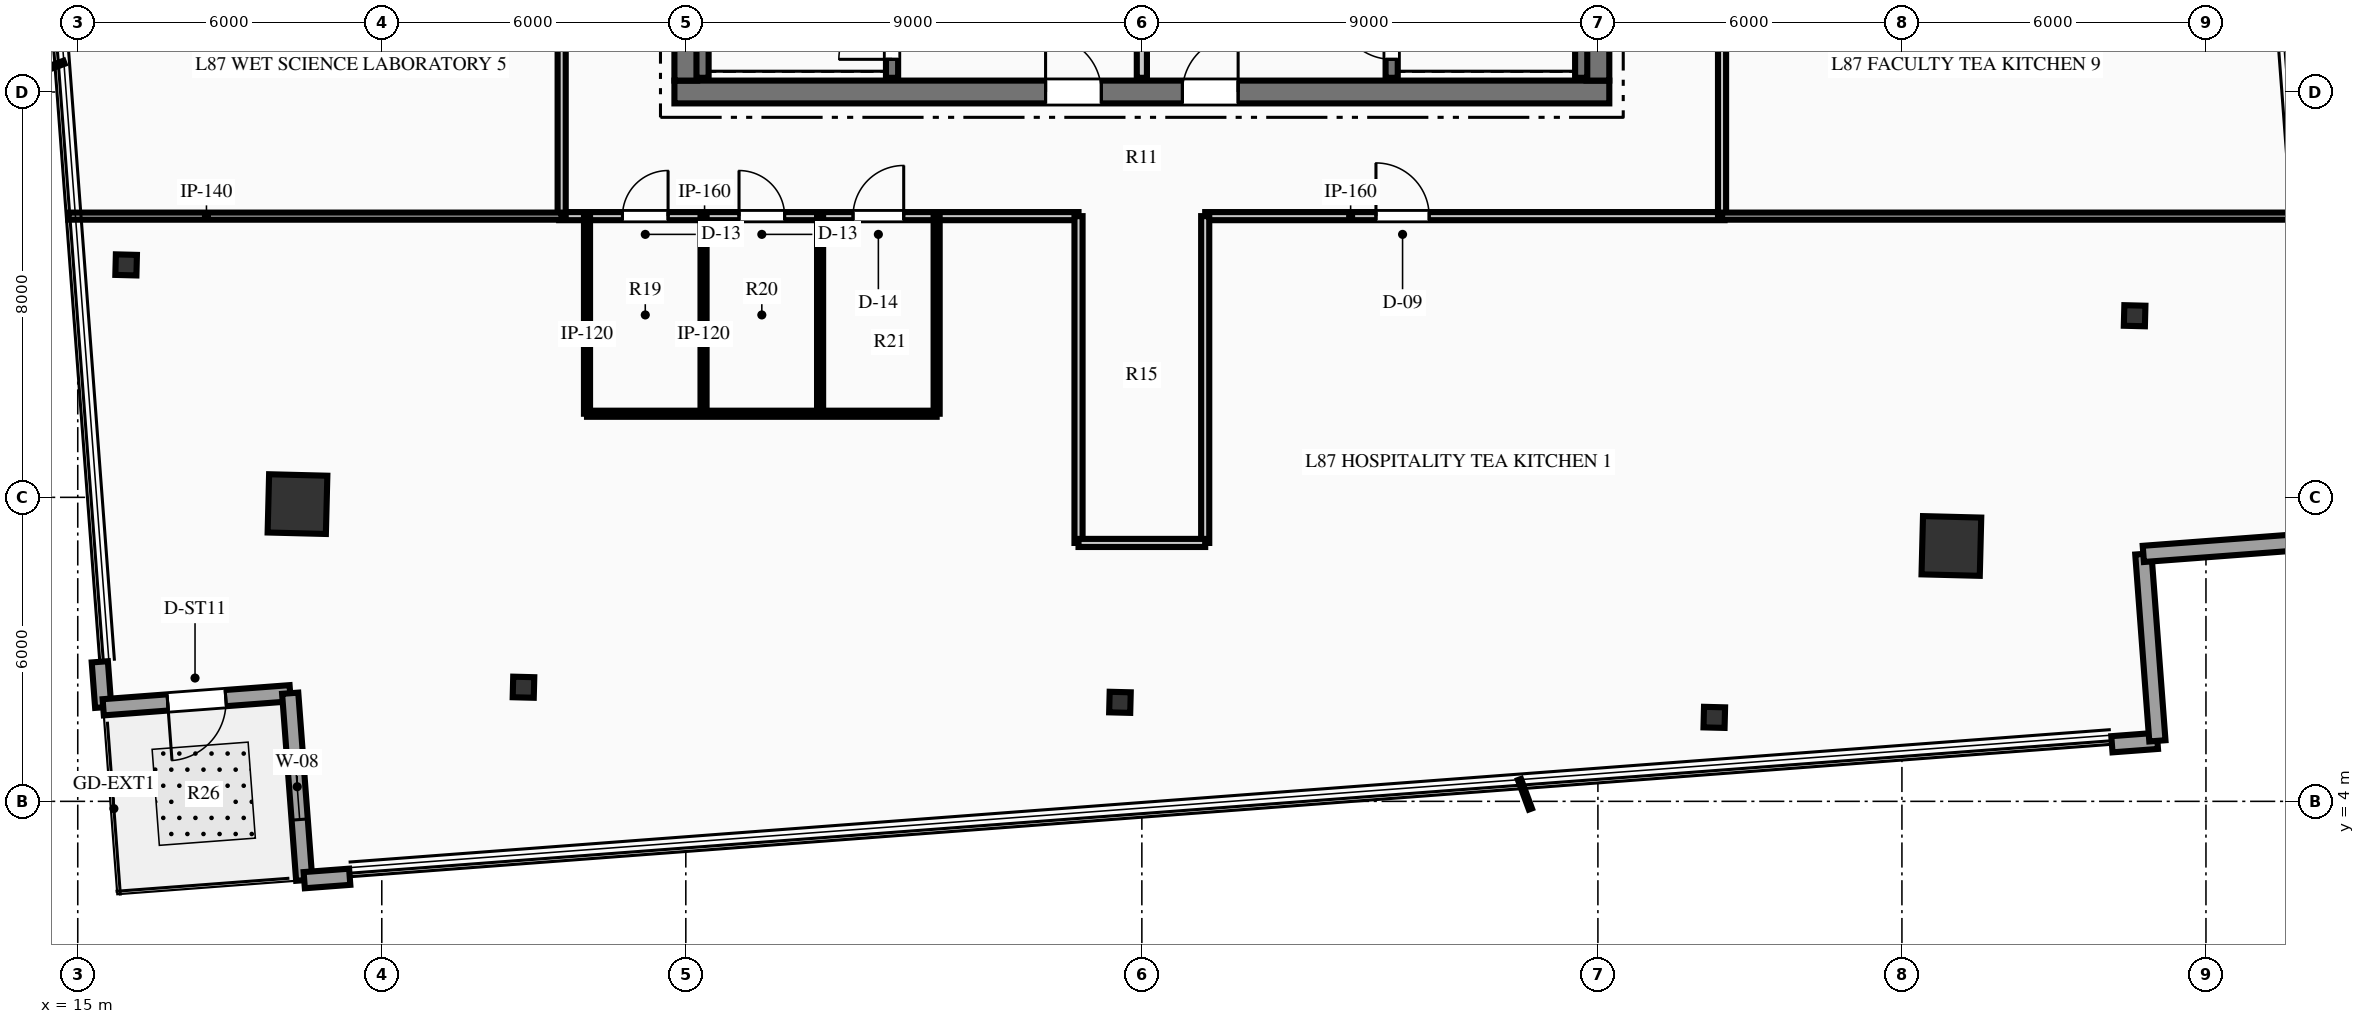
"""IFC4 building model, lengths in metres.
Left out: names, types, materials, properties, quantities, classifications, styles, units other than length and angle.
Written with IfcOpenShell. Run it as: python <this file> out.ifc"""

import sys

from ifc_helpers import new_model, si_unit, direction, frame, frame_2d, origin, origin_2d, place, context, subcontext, project, spatial, rectangle, hollow_rectangle, i_section, extrude, element, fill, save


model = new_model("IFC4")
c1 = context("Model", 3, precision=1e-05, world=origin(), true_north=direction((0.0, 1.0)))
c2 = subcontext(c1, "Body", "Model", "MODEL_VIEW")
j1 = project(units=[si_unit("LENGTHUNIT", "METRE"), si_unit("PLANEANGLEUNIT", "RADIAN")], contexts=[c1])
p1 = place(None, origin())
s1 = spatial("IfcSite", under=j1, at=p1, CompositionType="ELEMENT")
p2 = place(p1, origin())
s2 = spatial("IfcBuilding", under=s1, at=p2, CompositionType="ELEMENT")
p3 = place(p2, frame((0.0, 0.0, 343.95)))
s3 = spatial("IfcBuildingStorey", under=s2, at=p3, CompositionType="ELEMENT", Elevation=343.95)
p4 = place(p3, frame((26.775, 18.0, 0.0), z_axis=(0.0, 0.0, 1.0), x_axis=(1.0, 0.0, 0.0)))
e1 = element("IfcWall", 1, at=p4, inside=s3, PredefinedType="SHEAR", context=c2, shape_type="SweptSolid", body=[
    extrude(rectangle(XDim=18.45, YDim=0.45, at=frame_2d((9.225, 0.0))), origin(), (0.0, 0.0, 1.0), 3.75),
])
p5 = place(p4, frame((7.325, 0.0, 0.0)))
e2 = element("IfcOpeningElement", 2, at=p5, cuts=e1, PredefinedType="OPENING", context=c2, shape_type="SweptSolid", body=[
    extrude(rectangle(XDim=1.1, YDim=2.15, at=frame_2d((0.55, 1.075))), frame((0.0, 0.235, 0.0), z_axis=(0.0, -1.0, 0.0), x_axis=(1.0, 0.0, 0.0)), (0.0, 0.0, 1.0), 0.47),
])
p6 = place(p4, frame((10.025, 0.0, 0.0)))
e3 = element("IfcOpeningElement", 3, at=p6, cuts=e1, PredefinedType="OPENING", context=c2, shape_type="SweptSolid", body=[
    extrude(rectangle(XDim=1.1, YDim=2.15, at=frame_2d((0.55, 1.075))), frame((0.0, 0.235, 0.0), z_axis=(0.0, -1.0, 0.0), x_axis=(1.0, 0.0, 0.0)), (0.0, 0.0, 1.0), 0.47),
])
p7 = place(p3, frame((27.0, 18.225, 0.0), z_axis=(0.0, 0.0, 1.0), x_axis=(0.0, 1.0, 0.0)))
e4 = element("IfcWall", 4, at=p7, inside=s3, PredefinedType="SHEAR", context=c2, shape_type="SweptSolid", body=[
    extrude(rectangle(XDim=15.55, YDim=0.45, at=frame_2d((7.775, 0.0))), origin(), (0.0, 0.0, 1.0), 3.75),
])
p8 = place(p7, frame((10.015, 0.0, 0.0)))
e5 = element("IfcOpeningElement", 5, at=p8, cuts=e4, PredefinedType="OPENING", context=c2, shape_type="SweptSolid", body=[
    extrude(rectangle(XDim=1.4, YDim=2.2, at=frame_2d((0.7, 1.1))), frame((0.0, 0.235, 0.0), z_axis=(0.0, -1.0, 0.0), x_axis=(1.0, 0.0, 0.0)), (0.0, 0.0, 1.0), 0.47),
])
p9 = place(p3, frame((45.0, 18.225, 0.0), z_axis=(0.0, 0.0, 1.0), x_axis=(0.0, 1.0, 0.0)))
e6 = element("IfcWall", 6, at=p9, inside=s3, PredefinedType="SHEAR", context=c2, shape_type="SweptSolid", body=[
    extrude(rectangle(XDim=15.55, YDim=0.45, at=frame_2d((7.775, 0.0))), origin(), (0.0, 0.0, 1.0), 3.75),
])
p10 = place(p9, frame((10.015, 0.0, 0.0)))
e7 = element("IfcOpeningElement", 7, at=p10, cuts=e6, PredefinedType="OPENING", context=c2, shape_type="SweptSolid", body=[
    extrude(rectangle(XDim=1.4, YDim=2.2, at=frame_2d((0.7, 1.1))), frame((0.0, 0.235, 0.0), z_axis=(0.0, -1.0, 0.0), x_axis=(1.0, 0.0, 0.0)), (0.0, 0.0, 1.0), 0.47),
])
p11 = place(p3, frame((31.07, 18.28, 0.0), z_axis=(0.0, 0.0, 1.0), x_axis=(0.0, 1.0, 0.0)))
e8 = element("IfcWall", 8, at=p11, inside=s3, PredefinedType="SHEAR", context=c2, shape_type="SweptSolid", body=[
    extrude(rectangle(XDim=8.26, YDim=0.24, at=frame_2d((4.13, 0.0))), origin(), (0.0, 0.0, 1.0), 3.75),
])
p12 = place(p11, frame((0.365, 0.0, 0.0)))
e9 = element("IfcOpeningElement", 9, at=p12, cuts=e8, PredefinedType="OPENING", context=c2, shape_type="SweptSolid", body=[
    extrude(rectangle(XDim=1.05, YDim=2.15, at=frame_2d((0.525, 1.075))), frame((0.0, 0.13, 0.0), z_axis=(0.0, -1.0, 0.0), x_axis=(1.0, 0.0, 0.0)), (0.0, 0.0, 1.0), 0.26),
])
p13 = place(p3, frame((27.33, 18.28, 0.0), z_axis=(0.0, 0.0, 1.0), x_axis=(0.0, 1.0, 0.0)))
e10 = element("IfcWall", 10, at=p13, inside=s3, PredefinedType="SHEAR", context=c2, shape_type="SweptSolid", body=[
    extrude(rectangle(XDim=8.26, YDim=0.24, at=frame_2d((4.13, 0.0))), origin(), (0.0, 0.0, 1.0), 3.75),
])
p14 = place(p3, frame((40.93, 18.28, 0.0), z_axis=(0.0, 0.0, 1.0), x_axis=(0.0, 1.0, 0.0)))
e11 = element("IfcWall", 11, at=p14, inside=s3, PredefinedType="SHEAR", context=c2, shape_type="SweptSolid", body=[
    extrude(rectangle(XDim=8.26, YDim=0.24, at=frame_2d((4.13, 0.0))), origin(), (0.0, 0.0, 1.0), 3.75),
])
p15 = place(p14, frame((0.365, 0.0, 0.0)))
e12 = element("IfcOpeningElement", 12, at=p15, cuts=e11, PredefinedType="OPENING", context=c2, shape_type="SweptSolid", body=[
    extrude(rectangle(XDim=1.05, YDim=2.15, at=frame_2d((0.525, 1.075))), frame((0.0, 0.13, 0.0), z_axis=(0.0, -1.0, 0.0), x_axis=(1.0, 0.0, 0.0)), (0.0, 0.0, 1.0), 0.26),
])
p16 = place(p3, frame((44.67, 18.28, 0.0), z_axis=(0.0, 0.0, 1.0), x_axis=(0.0, 1.0, 0.0)))
e13 = element("IfcWall", 13, at=p16, inside=s3, PredefinedType="SHEAR", context=c2, shape_type="SweptSolid", body=[
    extrude(rectangle(XDim=8.26, YDim=0.24, at=frame_2d((4.13, 0.0))), origin(), (0.0, 0.0, 1.0), 3.75),
])
for number, where, z_axis, x_axis in (
    (14, (51.976, 9.04, 0.0), (0.0, 0.0, 1.0), (0.025, 1.0, 0.0)),
    (15, (19.336, 9.866, 0.0), (0.0, 0.0, 1.0), (0.025, 1.0, 0.0)),
):
    element("IfcColumn", number, at=place(p3, frame(where, z_axis=z_axis, x_axis=x_axis)), inside=s3, PredefinedType="COLUMN", context=c2, shape_type="SweptSolid", body=[
        extrude(hollow_rectangle(XDim=1.15, YDim=1.15, WallThickness=0.05, at=origin_2d()), origin(), (0.0, 0.0, 1.0), 3.75),
    ])
for number, where, z_axis, x_axis in (
    (16, (55.592, 13.584, 0.0), (0.0, 0.0, 1.0), (0.025, 1.0, 0.0)),
    (17, (15.955, 14.588, 0.0), (0.0, 0.0, 1.0), (0.025, 1.0, 0.0)),
    (18, (23.796, 6.252, 0.0), (0.0, 0.0, 1.0), (0.025, 1.0, 0.0)),
    (19, (35.568, 5.955, 0.0), (0.0, 0.0, 1.0), (0.025, 1.0, 0.0)),
    (20, (47.297, 5.658, 0.0), (0.0, 0.0, 1.0), (0.025, 1.0, 0.0)),
):
    element("IfcColumn", number, at=place(p3, frame(where, z_axis=z_axis, x_axis=x_axis)), inside=s3, PredefinedType="COLUMN", context=c2, shape_type="SweptSolid", body=[
        extrude(i_section(OverallWidth=0.406, OverallDepth=0.416, WebThickness=0.03, FlangeThickness=0.048, at=origin_2d()), origin(), (0.0, 0.0, 1.0), 3.75),
    ])
p17 = place(p3, frame((15.503, 5.856, 0.0), z_axis=(0.0, 0.0, 1.0), x_axis=(-0.075140616575, 0.997172947758, 0.0)))
e21 = element("IfcWall", 21, at=p17, inside=s3, PredefinedType="STANDARD", context=c2, shape_type="SweptSolid", body=[
    extrude(rectangle(XDim=0.9, YDim=0.32, at=frame_2d((0.45, 0.0))), origin(), (0.0, 0.0, 1.0), 3.43),
])
p18 = place(p3, frame((19.192, 6.134, 0.0), z_axis=(0.0, 0.0, 1.0), x_axis=(-0.99718649992, -0.074960552138, 0.0)))
e22 = element("IfcWall", 22, at=p18, inside=s3, PredefinedType="STANDARD", context=c2, shape_type="SweptSolid", body=[
    extrude(rectangle(XDim=3.7, YDim=0.32, at=frame_2d((1.85, 0.0))), origin(), (0.0, 0.0, 1.0), 3.43),
])
p19 = place(p18, frame((1.275, 0.0, 0.0)))
e23 = element("IfcOpeningElement", 23, at=p19, cuts=e22, PredefinedType="OPENING", context=c2, shape_type="SweptSolid", body=[
    extrude(rectangle(XDim=1.15, YDim=2.2, at=frame_2d((0.575, 1.1))), frame((0.0, 0.17, 0.0), z_axis=(0.0, -1.0, 0.0), x_axis=(1.0, 0.0, 0.0)), (0.0, 0.0, 1.0), 0.34),
])
p20 = place(p3, frame((19.469, 2.444, 0.0), z_axis=(0.0, 0.0, 1.0), x_axis=(-0.074960552138, 0.99718649992, 0.0)))
e24 = element("IfcWall", 24, at=p20, inside=s3, PredefinedType="STANDARD", context=c2, shape_type="SweptSolid", body=[
    extrude(rectangle(XDim=3.7, YDim=0.32, at=frame_2d((1.85, 0.0))), origin(), (0.0, 0.0, 1.0), 3.43),
])
p21 = place(p20, frame((1.2, 0.0, 0.85)))
e25 = element("IfcOpeningElement", 25, at=p21, cuts=e24, PredefinedType="OPENING", context=c2, shape_type="SweptSolid", body=[
    extrude(rectangle(XDim=1.3, YDim=1.9, at=frame_2d((0.65, 0.95))), frame((0.0, 0.17, 0.0), z_axis=(0.0, -1.0, 0.0), x_axis=(1.0, 0.0, 0.0)), (0.0, 0.0, 1.0), 0.34),
])
for number, where, z_axis, x_axis in (
    (26, (56.042, 5.194, 0.0), (0.0, 0.0, 1.0), (-0.997, -0.075, 0.0)),
    (27, (20.367, 2.512, 0.0), (0.0, 0.0, 1.0), (-0.997, -0.075, 0.0)),
):
    element("IfcWall", number, at=place(p3, frame(where, z_axis=z_axis, x_axis=x_axis)), inside=s3, PredefinedType="STANDARD", context=c2, shape_type="SweptSolid", body=[
        extrude(rectangle(XDim=0.9, YDim=0.32, at=frame_2d((0.45, 0.0))), origin(), (0.0, 0.0, 1.0), 3.43),
    ])
for number, where, z_axis, x_axis in (
    (28, (55.764, 8.884, 0.0), (0.0, 0.0, 1.0), (0.075, -0.997, 0.0)),
    (29, (59.454, 9.161, 0.0), (0.0, 0.0, 1.0), (-0.997, -0.075, 0.0)),
):
    element("IfcWall", number, at=place(p3, frame(where, z_axis=z_axis, x_axis=x_axis)), inside=s3, PredefinedType="STANDARD", context=c2, shape_type="SweptSolid", body=[
        extrude(rectangle(XDim=3.7, YDim=0.32, at=frame_2d((1.85, 0.0))), origin(), (0.0, 0.0, 1.0), 3.43),
    ])
p22 = place(p3, frame((36.0, 18.28, 0.0), z_axis=(0.0, 0.0, 1.0), x_axis=(0.0, 1.0, 0.0)))
e30 = element("IfcWall", 30, at=p22, inside=s3, PredefinedType="PARTITIONING", context=c2, shape_type="SweptSolid", body=[
    extrude(rectangle(XDim=3.77, YDim=0.2, at=frame_2d((1.885, 0.0))), origin(), (0.0, 0.0, 1.0), 3.43),
])
p23 = place(p3, frame((24.5, 15.55, 0.0), z_axis=(0.0, 0.0, 1.0), x_axis=(1.0, 0.0, 0.0)))
e31 = element("IfcWall", 31, at=p23, inside=s3, PredefinedType="PARTITIONING", context=c2, shape_type="SweptSolid", body=[
    extrude(rectangle(XDim=10.25, YDim=0.16, at=frame_2d((5.125, 0.0))), origin(), (0.0, 0.0, 1.0), 3.43),
])
p24 = place(p23, frame((1.25, 0.0, 0.0)))
e32 = element("IfcOpeningElement", 32, at=p24, cuts=e31, PredefinedType="OPENING", context=c2, shape_type="SweptSolid", body=[
    extrude(rectangle(XDim=0.9, YDim=2.15, at=frame_2d((0.45, 1.075))), frame((0.0, 0.09, 0.0), z_axis=(0.0, -1.0, 0.0), x_axis=(1.0, 0.0, 0.0)), (0.0, 0.0, 1.0), 0.18),
])
p25 = place(p23, frame((3.55, 0.0, 0.0)))
e33 = element("IfcOpeningElement", 33, at=p25, cuts=e31, PredefinedType="OPENING", context=c2, shape_type="SweptSolid", body=[
    extrude(rectangle(XDim=0.9, YDim=2.15, at=frame_2d((0.45, 1.075))), frame((0.0, 0.09, 0.0), z_axis=(0.0, -1.0, 0.0), x_axis=(1.0, 0.0, 0.0)), (0.0, 0.0, 1.0), 0.18),
])
p26 = place(p23, frame((5.8, 0.0, 0.0)))
e34 = element("IfcOpeningElement", 34, at=p26, cuts=e31, PredefinedType="OPENING", context=c2, shape_type="SweptSolid", body=[
    extrude(rectangle(XDim=1.0, YDim=2.15, at=frame_2d((0.5, 1.075))), frame((0.0, 0.09, 0.0), z_axis=(0.0, -1.0, 0.0), x_axis=(1.0, 0.0, 0.0)), (0.0, 0.0, 1.0), 0.18),
])
p27 = place(p3, frame((37.25, 15.55, 0.0), z_axis=(0.0, 0.0, 1.0), x_axis=(1.0, 0.0, 0.0)))
e35 = element("IfcWall", 35, at=p27, inside=s3, PredefinedType="PARTITIONING", context=c2, shape_type="SweptSolid", body=[
    extrude(rectangle(XDim=10.25, YDim=0.16, at=frame_2d((5.125, 0.0))), origin(), (0.0, 0.0, 1.0), 3.43),
])
p28 = place(p27, frame((3.37, 0.0, 0.0)))
e36 = element("IfcOpeningElement", 36, at=p28, cuts=e35, PredefinedType="OPENING", context=c2, shape_type="SweptSolid", body=[
    extrude(rectangle(XDim=1.05, YDim=2.15, at=frame_2d((0.525, 1.075))), frame((0.0, 0.09, 0.0), z_axis=(0.0, -1.0, 0.0), x_axis=(1.0, 0.0, 0.0)), (0.0, 0.0, 1.0), 0.18),
])
p29 = place(p3, frame((24.55, 15.55, 0.0), z_axis=(0.0, 0.0, 1.0), x_axis=(0.0, 1.0, 0.0)))
e37 = element("IfcWall", 37, at=p29, inside=s3, PredefinedType="PARTITIONING", context=c2, shape_type="SweptSolid", body=[
    extrude(rectangle(XDim=9.2, YDim=0.16, at=frame_2d((4.6, 0.0))), origin(), (0.0, 0.0, 1.0), 3.43),
])
p30 = place(p29, frame((3.747, 0.0, 0.0)))
e38 = element("IfcOpeningElement", 38, at=p30, cuts=e37, PredefinedType="OPENING", context=c2, shape_type="SweptSolid", body=[
    extrude(rectangle(XDim=1.05, YDim=2.15, at=frame_2d((0.525, 1.075))), frame((0.0, 0.09, 0.0), z_axis=(0.0, -1.0, 0.0), x_axis=(1.0, 0.0, 0.0)), (0.0, 0.0, 1.0), 0.18),
])
p31 = place(p3, frame((47.45, 15.55, 0.0), z_axis=(0.0, 0.0, 1.0), x_axis=(0.0, 1.0, 0.0)))
e39 = element("IfcWall", 39, at=p31, inside=s3, PredefinedType="PARTITIONING", context=c2, shape_type="SweptSolid", body=[
    extrude(rectangle(XDim=9.2, YDim=0.16, at=frame_2d((4.6, 0.0))), origin(), (0.0, 0.0, 1.0), 3.43),
])
p32 = place(p31, frame((3.747, 0.0, 0.0)))
e40 = element("IfcOpeningElement", 40, at=p32, cuts=e39, PredefinedType="OPENING", context=c2, shape_type="SweptSolid", body=[
    extrude(rectangle(XDim=1.05, YDim=2.15, at=frame_2d((0.525, 1.075))), frame((0.0, 0.09, 0.0), z_axis=(0.0, -1.0, 0.0), x_axis=(1.0, 0.0, 0.0)), (0.0, 0.0, 1.0), 0.18),
])
for number, where, z_axis, x_axis in (
    (41, (34.75, 9.1, 0.0), (0.0, 0.0, 1.0), (0.0, 1.0, 0.0)),
    (42, (37.25, 9.1, 0.0), (0.0, 0.0, 1.0), (0.0, 1.0, 0.0)),
):
    element("IfcWall", number, at=place(p3, frame(where, z_axis=z_axis, x_axis=x_axis)), inside=s3, PredefinedType="PARTITIONING", context=c2, shape_type="SweptSolid", body=[
        extrude(rectangle(XDim=6.45, YDim=0.16, at=frame_2d((3.225, 0.0))), origin(), (0.0, 0.0, 1.0), 3.43),
    ])
p33 = place(p3, frame((34.75, 9.1, 0.0), z_axis=(0.0, 0.0, 1.0), x_axis=(1.0, 0.0, 0.0)))
e43 = element("IfcWall", 43, at=p33, inside=s3, PredefinedType="PARTITIONING", context=c2, shape_type="SweptSolid", body=[
    extrude(rectangle(XDim=2.5, YDim=0.16, at=frame_2d((1.25, 0.0))), origin(), (0.0, 0.0, 1.0), 3.43),
])
p34 = place(p3, frame((25.05, 11.65, 0.0), z_axis=(0.0, 0.0, 1.0), x_axis=(0.0, 1.0, 0.0)))
e44 = element("IfcWall", 44, at=p34, inside=s3, PredefinedType="PARTITIONING", context=c2, shape_type="SweptSolid", body=[
    extrude(rectangle(XDim=3.9, YDim=0.12, at=frame_2d((1.95, 0.0))), origin(), (0.0, 0.0, 1.0), 3.019),
])
for number, where, z_axis, x_axis in (
    (45, (27.35, 11.65, 0.0), (0.0, 0.0, 1.0), (0.0, 1.0, 0.0)),
    (46, (29.65, 11.65, 0.0), (0.0, 0.0, 1.0), (0.0, 1.0, 0.0)),
    (47, (31.95, 11.65, 0.0), (0.0, 0.0, 1.0), (0.0, 1.0, 0.0)),
):
    element("IfcWall", number, at=place(p3, frame(where, z_axis=z_axis, x_axis=x_axis)), inside=s3, PredefinedType="PARTITIONING", context=c2, shape_type="SweptSolid", body=[
        extrude(rectangle(XDim=3.9, YDim=0.12, at=frame_2d((1.95, 0.0))), origin(), (0.0, 0.0, 1.0), 3.43),
    ])
p35 = place(p3, frame((25.05, 11.65, 0.0), z_axis=(0.0, 0.0, 1.0), x_axis=(1.0, 0.0, 0.0)))
e48 = element("IfcWall", 48, at=p35, inside=s3, PredefinedType="PARTITIONING", context=c2, shape_type="SweptSolid", body=[
    extrude(rectangle(XDim=6.9, YDim=0.12, at=frame_2d((3.45, 0.0))), origin(), (0.0, 0.0, 1.0), 3.43),
])
p36 = place(p3, frame((14.814, 15.55, 0.0), z_axis=(0.0, 0.0, 1.0), x_axis=(1.0, 0.0, 0.0)))
e49 = element("IfcWall", 49, at=p36, inside=s3, PredefinedType="PARTITIONING", context=c2, shape_type="SweptSolid", body=[
    extrude(rectangle(XDim=9.736, YDim=0.14, at=frame_2d((4.868, 0.0))), origin(), (0.0, 0.0, 1.0), 2.808),
])
p37 = place(p3, frame((47.45, 15.55, 0.0), z_axis=(0.0, 0.0, 1.0), x_axis=(1.0, 0.0, 0.0)))
e50 = element("IfcWall", 50, at=p37, inside=s3, PredefinedType="PARTITIONING", context=c2, shape_type="SweptSolid", body=[
    extrude(rectangle(XDim=11.483, YDim=0.14, at=frame_2d((5.742, 0.0))), origin(), (0.0, 0.0, 1.0), 3.019),
])
p38 = place(p19, origin())
e51 = element("IfcDoor", 51, at=p38, inside=s3, OperationType="SINGLE_SWING_RIGHT", PredefinedType="DOOR", context=c2, shape_type="SweptSolid", body=[
    extrude(rectangle(XDim=1.15, YDim=2.2, at=frame_2d((0.575, 1.1))), frame((0.0, 0.025, 0.0), z_axis=(0.0, -1.0, 0.0), x_axis=(1.0, 0.0, 0.0)), (0.0, 0.0, 1.0), 0.05),
])
fill(e23, e51)
p39 = place(p21, origin())
e52 = element("IfcWindow", 52, at=p39, inside=s3, PartitioningType="SINGLE_PANEL", PredefinedType="WINDOW", context=c2, shape_type="SweptSolid", body=[
    extrude(rectangle(XDim=1.3, YDim=1.9, at=frame_2d((0.65, 0.95))), frame((0.0, 0.03, 0.0), z_axis=(0.0, -1.0, 0.0), x_axis=(1.0, 0.0, 0.0)), (0.0, 0.0, 1.0), 0.06),
])
fill(e25, e52)
p40 = place(p12, origin())
e53 = element("IfcDoor", 53, at=p40, inside=s3, OperationType="SINGLE_SWING_LEFT", PredefinedType="DOOR", context=c2, shape_type="SweptSolid", body=[
    extrude(rectangle(XDim=1.05, YDim=2.15, at=frame_2d((0.525, 1.075))), frame((0.0, 0.025, 0.0), z_axis=(0.0, -1.0, 0.0), x_axis=(1.0, 0.0, 0.0)), (0.0, 0.0, 1.0), 0.05),
])
fill(e9, e53)
p41 = place(p15, origin())
e54 = element("IfcDoor", 54, at=p41, inside=s3, OperationType="SINGLE_SWING_RIGHT", PredefinedType="DOOR", context=c2, shape_type="SweptSolid", body=[
    extrude(rectangle(XDim=1.05, YDim=2.15, at=frame_2d((0.525, 1.075))), frame((0.0, 0.025, 0.0), z_axis=(0.0, -1.0, 0.0), x_axis=(1.0, 0.0, 0.0)), (0.0, 0.0, 1.0), 0.05),
])
fill(e12, e54)
p42 = place(p5, origin())
e55 = element("IfcDoor", 55, at=p42, inside=s3, OperationType="SINGLE_SWING_LEFT", PredefinedType="DOOR", context=c2, shape_type="SweptSolid", body=[
    extrude(rectangle(XDim=1.1, YDim=2.15, at=frame_2d((0.55, 1.075))), frame((0.0, 0.025, 0.0), z_axis=(0.0, -1.0, 0.0), x_axis=(1.0, 0.0, 0.0)), (0.0, 0.0, 1.0), 0.05),
])
fill(e2, e55)
p43 = place(p6, origin())
e56 = element("IfcDoor", 56, at=p43, inside=s3, OperationType="SINGLE_SWING_RIGHT", PredefinedType="DOOR", context=c2, shape_type="SweptSolid", body=[
    extrude(rectangle(XDim=1.1, YDim=2.15, at=frame_2d((0.55, 1.075))), frame((0.0, 0.025, 0.0), z_axis=(0.0, -1.0, 0.0), x_axis=(1.0, 0.0, 0.0)), (0.0, 0.0, 1.0), 0.05),
])
fill(e3, e56)
p44 = place(p24, origin())
e57 = element("IfcDoor", 57, at=p44, inside=s3, OperationType="SINGLE_SWING_RIGHT", PredefinedType="DOOR", context=c2, shape_type="SweptSolid", body=[
    extrude(rectangle(XDim=0.9, YDim=2.15, at=frame_2d((0.45, 1.075))), frame((0.0, 0.025, 0.0), z_axis=(0.0, -1.0, 0.0), x_axis=(1.0, 0.0, 0.0)), (0.0, 0.0, 1.0), 0.05),
])
fill(e32, e57)
p45 = place(p25, origin())
e58 = element("IfcDoor", 58, at=p45, inside=s3, OperationType="SINGLE_SWING_LEFT", PredefinedType="DOOR", context=c2, shape_type="SweptSolid", body=[
    extrude(rectangle(XDim=0.9, YDim=2.15, at=frame_2d((0.45, 1.075))), frame((0.0, 0.025, 0.0), z_axis=(0.0, -1.0, 0.0), x_axis=(1.0, 0.0, 0.0)), (0.0, 0.0, 1.0), 0.05),
])
fill(e33, e58)
p46 = place(p26, origin())
e59 = element("IfcDoor", 59, at=p46, inside=s3, OperationType="SINGLE_SWING_RIGHT", PredefinedType="DOOR", context=c2, shape_type="SweptSolid", body=[
    extrude(rectangle(XDim=1.0, YDim=2.15, at=frame_2d((0.5, 1.075))), frame((0.0, 0.025, 0.0), z_axis=(0.0, -1.0, 0.0), x_axis=(1.0, 0.0, 0.0)), (0.0, 0.0, 1.0), 0.05),
])
fill(e34, e59)
p47 = place(p28, origin())
e60 = element("IfcDoor", 60, at=p47, inside=s3, OperationType="SINGLE_SWING_LEFT", PredefinedType="DOOR", context=c2, shape_type="SweptSolid", body=[
    extrude(rectangle(XDim=1.05, YDim=2.15, at=frame_2d((0.525, 1.075))), frame((0.0, 0.025, 0.0), z_axis=(0.0, -1.0, 0.0), x_axis=(1.0, 0.0, 0.0)), (0.0, 0.0, 1.0), 0.05),
])
fill(e36, e60)
save(model, sys.argv[1])
